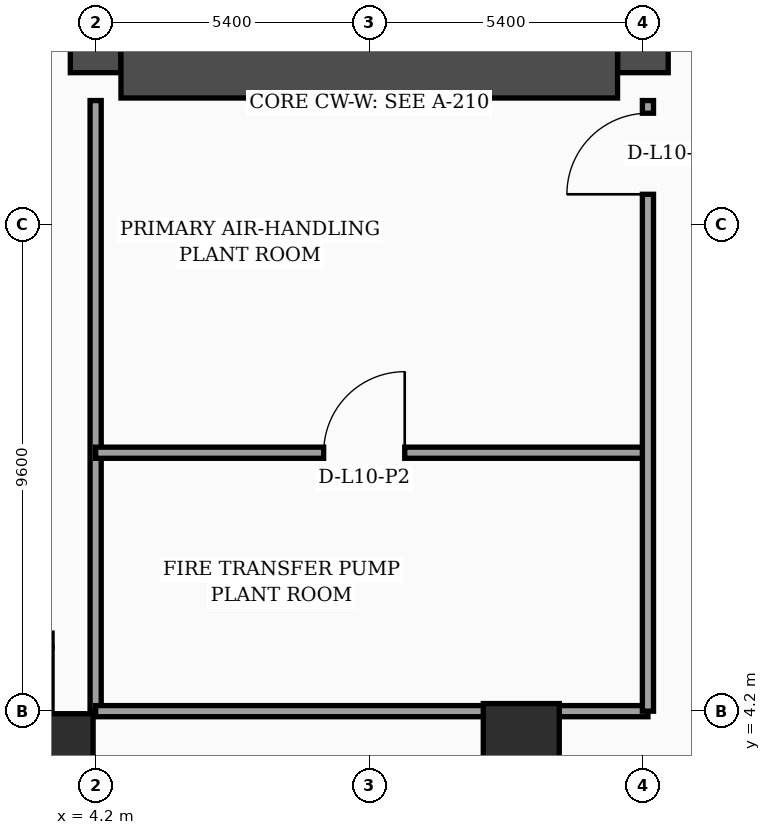
"""IFC4 building model, lengths in metres.
Left out: names, types, materials, properties, quantities, classifications, styles, units other than length and angle.
Written with IfcOpenShell. Run it as: python <this file> out.ifc"""

import sys

from ifc_helpers import new_model, si_unit, direction, frame, frame_2d, origin, origin_2d, place, context, subcontext, project, spatial, rectangle, hollow_rectangle, extrude, element, fill, save


model = new_model("IFC4")
c1 = context("Model", 3, precision=1e-05, world=origin(), true_north=direction((0.0, 1.0)))
c2 = subcontext(c1, "Body", "Model", "MODEL_VIEW")
j1 = project(units=[si_unit("LENGTHUNIT", "METRE"), si_unit("PLANEANGLEUNIT", "RADIAN")], contexts=[c1])
p1 = place(None, origin())
s1 = spatial("IfcSite", under=j1, at=p1, CompositionType="ELEMENT")
p2 = place(p1, origin())
s2 = spatial("IfcBuilding", under=s1, at=p2, CompositionType="ELEMENT")
p3 = place(p2, frame((0.0, 0.0, 46.0)))
s3 = spatial("IfcBuildingStorey", under=s2, at=p3, CompositionType="ELEMENT", Elevation=46.0)
p4 = place(p3, frame((4.2, 16.8, 0.0), z_axis=(0.0, 0.0, 1.0), x_axis=(0.0, 1.0, 0.0)))
e1 = element("IfcWall", 1, at=p4, inside=s3, PredefinedType="SHEAR", context=c2, shape_type="SweptSolid", body=[
    extrude(rectangle(XDim=21.6, YDim=1.0, at=frame_2d((10.8, 0.0))), origin(), (0.0, 0.0, 1.0), 4.56),
])
p5 = place(p3, frame((15.0, 16.8, 0.0), z_axis=(0.0, 0.0, 1.0), x_axis=(0.0, 1.0, 0.0)))
e2 = element("IfcWall", 2, at=p5, inside=s3, PredefinedType="SHEAR", context=c2, shape_type="SweptSolid", body=[
    extrude(rectangle(XDim=21.6, YDim=1.0, at=frame_2d((10.8, 0.0))), origin(), (0.0, 0.0, 1.0), 4.56),
])
p6 = place(p5, frame((8.65, 0.0, 0.0)))
e3 = element("IfcOpeningElement", 3, at=p6, cuts=e2, PredefinedType="OPENING", context=c2, shape_type="SweptSolid", body=[
    extrude(rectangle(XDim=1.1, YDim=2.2, at=frame_2d((0.55, 1.1))), frame((0.0, 0.51, 0.0), z_axis=(0.0, -1.0, 0.0), x_axis=(1.0, 0.0, 0.0)), (0.0, 0.0, 1.0), 1.02),
])
p7 = place(p5, frame((1.25, 0.0, 0.0)))
e4 = element("IfcOpeningElement", 4, at=p7, cuts=e2, PredefinedType="OPENING", context=c2, shape_type="SweptSolid", body=[
    extrude(rectangle(XDim=1.1, YDim=2.2, at=frame_2d((0.55, 1.1))), frame((0.0, 0.51, 0.0), z_axis=(0.0, -1.0, 0.0), x_axis=(1.0, 0.0, 0.0)), (0.0, 0.0, 1.0), 1.02),
])
p8 = place(p5, frame((3.8, 0.0, 0.0)))
e5 = element("IfcOpeningElement", 5, at=p8, cuts=e2, PredefinedType="OPENING", context=c2, shape_type="SweptSolid", body=[
    extrude(rectangle(XDim=1.1, YDim=2.2, at=frame_2d((0.55, 1.1))), frame((0.0, 0.51, 0.0), z_axis=(0.0, -1.0, 0.0), x_axis=(1.0, 0.0, 0.0)), (0.0, 0.0, 1.0), 1.02),
])
p9 = place(p5, frame((6.35, 0.0, 0.0)))
e6 = element("IfcOpeningElement", 6, at=p9, cuts=e2, PredefinedType="OPENING", context=c2, shape_type="SweptSolid", body=[
    extrude(rectangle(XDim=1.1, YDim=2.2, at=frame_2d((0.55, 1.1))), frame((0.0, 0.51, 0.0), z_axis=(0.0, -1.0, 0.0), x_axis=(1.0, 0.0, 0.0)), (0.0, 0.0, 1.0), 1.02),
])
p10 = place(p3, frame((4.7, 16.8, 0.0), z_axis=(0.0, 0.0, 1.0), x_axis=(1.0, 0.0, 0.0)))
e7 = element("IfcWall", 7, at=p10, inside=s3, PredefinedType="SHEAR", context=c2, shape_type="SweptSolid", body=[
    extrude(rectangle(XDim=9.8, YDim=1.0, at=frame_2d((4.9, 0.0))), origin(), (0.0, 0.0, 1.0), 4.56),
])
p11 = place(p3, frame((3.6, 3.6, 0.0), z_axis=(0.0, 0.0, 1.0), x_axis=(1.0, 0.0, 0.0)))
e8 = element("IfcColumn", 8, at=p11, inside=s3, PredefinedType="COLUMN", context=c2, shape_type="SweptSolid", body=[
    extrude(hollow_rectangle(XDim=1.1, YDim=1.1, WallThickness=0.045, at=origin_2d()), origin(), (0.0, 0.0, 1.0), 4.56),
])
p12 = place(p3, frame((12.6, 3.6, 0.0), z_axis=(0.0, 0.0, 1.0), x_axis=(1.0, 0.0, 0.0)))
e9 = element("IfcColumn", 9, at=p12, inside=s3, PredefinedType="COLUMN", context=c2, shape_type="SweptSolid", body=[
    extrude(rectangle(XDim=1.5, YDim=1.5, at=origin_2d()), origin(), (0.0, 0.0, 1.0), 4.56),
])
p13 = place(p3, frame((4.2, 4.2, 0.0), z_axis=(0.0, 0.0, 1.0), x_axis=(0.0, 1.0, 0.0)))
e10 = element("IfcWall", 10, at=p13, inside=s3, PredefinedType="SOLIDWALL", context=c2, shape_type="SweptSolid", body=[
    extrude(rectangle(XDim=12.05, YDim=0.22, at=frame_2d((6.025, 0.0))), origin(), (0.0, 0.0, 1.0), 3.84),
])
p14 = place(p3, frame((4.2, 4.2, 0.0), z_axis=(0.0, 0.0, 1.0), x_axis=(1.0, 0.0, 0.0)))
e11 = element("IfcWall", 11, at=p14, inside=s3, PredefinedType="SOLIDWALL", context=c2, shape_type="SweptSolid", body=[
    extrude(rectangle(XDim=10.9, YDim=0.22, at=frame_2d((5.45, 0.0))), origin(), (0.0, 0.0, 1.0), 3.84),
])
p15 = place(p3, frame((4.2, 9.3, 0.0), z_axis=(0.0, 0.0, 1.0), x_axis=(1.0, 0.0, 0.0)))
e12 = element("IfcWall", 12, at=p15, inside=s3, PredefinedType="SOLIDWALL", context=c2, shape_type="SweptSolid", body=[
    extrude(rectangle(XDim=10.9, YDim=0.22, at=frame_2d((5.45, 0.0))), origin(), (0.0, 0.0, 1.0), 3.84),
])
p16 = place(p15, frame((4.5, 0.0, 0.0)))
e13 = element("IfcOpeningElement", 13, at=p16, cuts=e12, PredefinedType="OPENING", context=c2, shape_type="SweptSolid", body=[
    extrude(rectangle(XDim=1.6, YDim=2.35, at=frame_2d((0.8, 1.175))), frame((0.0, 0.12, 0.0), z_axis=(0.0, -1.0, 0.0), x_axis=(1.0, 0.0, 0.0)), (0.0, 0.0, 1.0), 0.24),
])
p17 = place(p3, frame((15.1, 4.2, 0.0), z_axis=(0.0, 0.0, 1.0), x_axis=(0.0, 1.0, 0.0)))
e14 = element("IfcWall", 14, at=p17, inside=s3, PredefinedType="SOLIDWALL", context=c2, shape_type="SweptSolid", body=[
    extrude(rectangle(XDim=12.05, YDim=0.22, at=frame_2d((6.025, 0.0))), origin(), (0.0, 0.0, 1.0), 3.34),
])
p18 = place(p17, frame((10.2, 0.0, 0.0)))
e15 = element("IfcOpeningElement", 15, at=p18, cuts=e14, PredefinedType="OPENING", context=c2, shape_type="SweptSolid", body=[
    extrude(rectangle(XDim=1.6, YDim=2.35, at=frame_2d((0.8, 1.175))), frame((0.0, 0.12, 0.0), z_axis=(0.0, -1.0, 0.0), x_axis=(1.0, 0.0, 0.0)), (0.0, 0.0, 1.0), 0.24),
])
p19 = place(p16, origin())
e16 = element("IfcDoor", 16, at=p19, inside=s3, OperationType="SINGLE_SWING_RIGHT", PredefinedType="DOOR", context=c2, shape_type="SweptSolid", body=[
    extrude(rectangle(XDim=1.6, YDim=2.35, at=frame_2d((0.8, 1.175))), frame((0.0, 0.025, 0.0), z_axis=(0.0, -1.0, 0.0), x_axis=(1.0, 0.0, 0.0)), (0.0, 0.0, 1.0), 0.05),
])
fill(e13, e16)
p20 = place(p18, origin())
e17 = element("IfcDoor", 17, at=p20, inside=s3, OperationType="SINGLE_SWING_LEFT", PredefinedType="DOOR", context=c2, shape_type="SweptSolid", body=[
    extrude(rectangle(XDim=1.6, YDim=2.35, at=frame_2d((0.8, 1.175))), frame((0.0, 0.025, 0.0), z_axis=(0.0, -1.0, 0.0), x_axis=(1.0, 0.0, 0.0)), (0.0, 0.0, 1.0), 0.05),
])
fill(e15, e17)
save(model, sys.argv[1])
